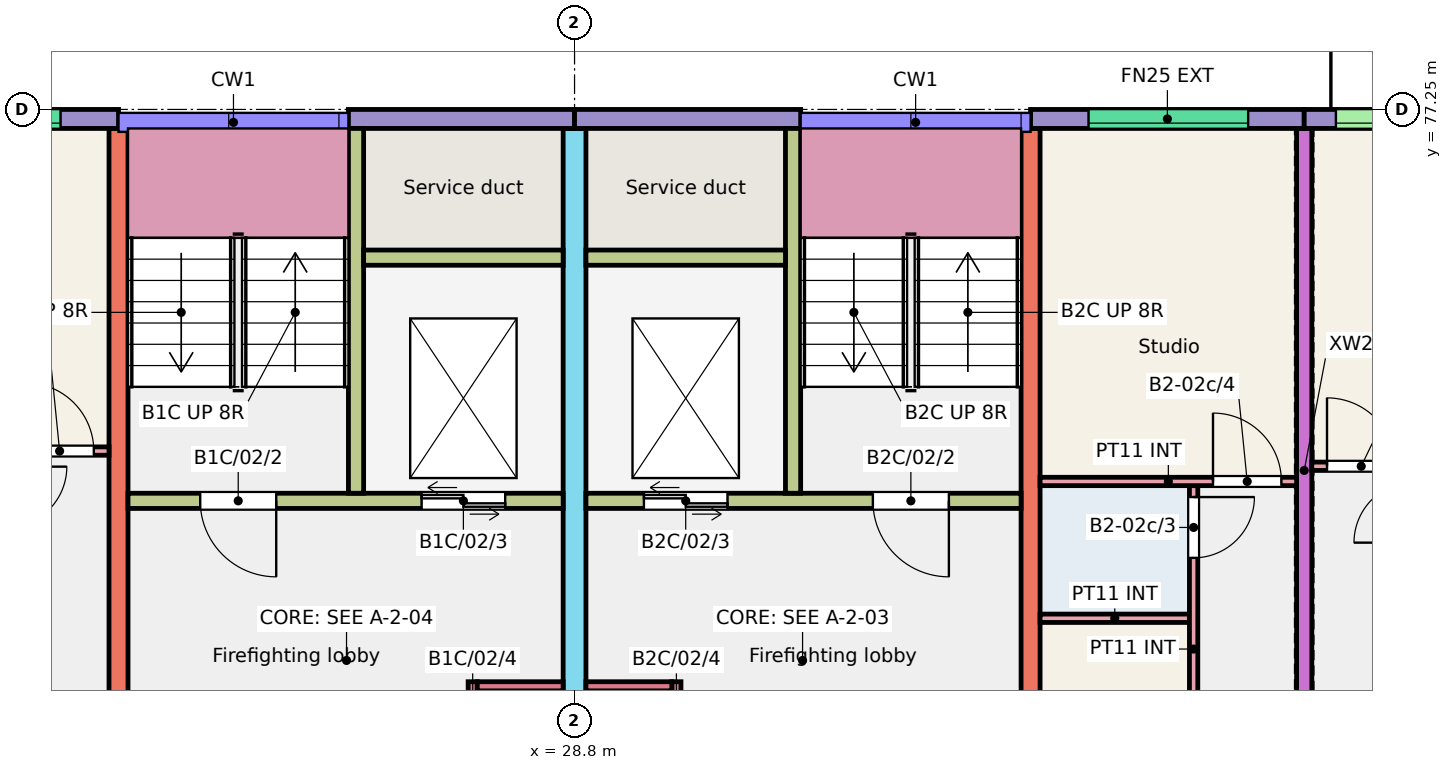
"""IFC4 building model, lengths in metres.
Left out: names, types, materials, properties, quantities, classifications, styles, units other than length and angle.
Written with IfcOpenShell. Run it as: python <this file> out.ifc"""

import sys

from ifc_helpers import new_model, si_unit, direction, frame, frame_2d, origin, place, context, subcontext, project, spatial, rectangle, extrude, element, fill, save


model = new_model("IFC4")
c1 = context("Model", 3, precision=1e-05, world=origin(), true_north=direction((0.0, 1.0)))
c2 = subcontext(c1, "Body", "Model", "MODEL_VIEW")
j1 = project(units=[si_unit("LENGTHUNIT", "METRE"), si_unit("PLANEANGLEUNIT", "RADIAN")], contexts=[c1])
p1 = place(None, origin())
s1 = spatial("IfcSite", under=j1, at=p1, CompositionType="ELEMENT")
p2 = place(p1, origin())
s2 = spatial("IfcBuilding", under=s1, at=p2, CompositionType="ELEMENT")
p3 = place(p2, frame((0.0, 0.0, 6.0)))
s3 = spatial("IfcBuildingStorey", under=s2, at=p3, CompositionType="ELEMENT", Elevation=6.0)
p4 = place(p3, frame((22.8, 68.0, 0.0), z_axis=(0.0, 0.0, 1.0), x_axis=(0.0, 1.0, 0.0)))
e1 = element("IfcWall", 1, at=p4, inside=s3, PredefinedType="SHEAR", context=c2, shape_type="SweptSolid", body=[
    extrude(rectangle(XDim=9.0, YDim=0.25, at=frame_2d((4.5, 0.0))), origin(), (0.0, 0.0, 1.0), 3.0),
])
p5 = place(p3, frame((28.8, 66.0, 0.0), z_axis=(0.0, 0.0, 1.0), x_axis=(0.0, 1.0, 0.0)))
e2 = element("IfcWall", 2, at=p5, inside=s3, PredefinedType="SHEAR", context=c2, shape_type="SweptSolid", body=[
    extrude(rectangle(XDim=11.0, YDim=0.3, at=frame_2d((5.5, 0.0))), origin(), (0.0, 0.0, 1.0), 3.0),
])
p6 = place(p5, frame((0.3, 0.0, 0.0)))
e3 = element("IfcOpeningElement", 3, at=p6, cuts=e2, PredefinedType="OPENING", context=c2, shape_type="SweptSolid", body=[
    extrude(rectangle(XDim=1.2, YDim=2.1, at=frame_2d((0.6, 1.05))), frame((0.0, 0.16, 0.0), z_axis=(0.0, -1.0, 0.0), x_axis=(1.0, 0.0, 0.0)), (0.0, 0.0, 1.0), 0.32),
])
p7 = place(p3, frame((34.8, 68.0, 0.0), z_axis=(0.0, 0.0, 1.0), x_axis=(0.0, 1.0, 0.0)))
e4 = element("IfcWall", 4, at=p7, inside=s3, PredefinedType="SHEAR", context=c2, shape_type="SweptSolid", body=[
    extrude(rectangle(XDim=9.0, YDim=0.25, at=frame_2d((4.5, 0.0))), origin(), (0.0, 0.0, 1.0), 3.0),
])
p8 = place(p3, frame((38.4, 68.0, 0.0), z_axis=(0.0, 0.0, 1.0), x_axis=(0.0, 1.0, 0.0)))
e5 = element("IfcWall", 5, at=p8, inside=s3, PredefinedType="SHEAR", context=c2, shape_type="SweptSolid", body=[
    extrude(rectangle(XDim=9.0, YDim=0.2, at=frame_2d((4.5, 0.0))), origin(), (0.0, 0.0, 1.0), 3.0),
])
p9 = place(p3, frame((19.2, 77.125, 0.0), z_axis=(0.0, 0.0, 1.0), x_axis=(1.0, 0.0, 0.0)))
e6 = element("IfcWall", 6, at=p9, inside=s3, PredefinedType="SOLIDWALL", context=c2, shape_type="SweptSolid", body=[
    extrude(rectangle(XDim=3.6, YDim=0.25, at=frame_2d((1.8, 0.0))), origin(), (0.0, 0.0, 1.0), 3.0),
])
p10 = place(p9, frame((0.738, 0.0, 1.2)))
e7 = element("IfcOpeningElement", 7, at=p10, cuts=e6, PredefinedType="OPENING", context=c2, shape_type="SweptSolid", body=[
    extrude(rectangle(XDim=2.1, YDim=1.2, at=frame_2d((1.05, 0.6))), frame((0.0, 0.135, 0.0), z_axis=(0.0, -1.0, 0.0), x_axis=(1.0, 0.0, 0.0)), (0.0, 0.0, 1.0), 0.27),
])
p11 = place(p3, frame((25.825, 77.125, 0.0), z_axis=(0.0, 0.0, 1.0), x_axis=(1.0, 0.0, 0.0)))
e8 = element("IfcWall", 8, at=p11, inside=s3, PredefinedType="SOLIDWALL", context=c2, shape_type="SweptSolid", body=[
    extrude(rectangle(XDim=2.975, YDim=0.25, at=frame_2d((1.488, 0.0))), origin(), (0.0, 0.0, 1.0), 3.0),
])
p12 = place(p3, frame((22.925, 72.1, 0.0), z_axis=(0.0, 0.0, 1.0), x_axis=(1.0, 0.0, 0.0)))
e9 = element("IfcWall", 9, at=p12, inside=s3, PredefinedType="SHEAR", context=c2, shape_type="SweptSolid", body=[
    extrude(rectangle(XDim=5.725, YDim=0.2, at=frame_2d((2.862, 0.0))), origin(), (0.0, 0.0, 1.0), 3.0),
])
p13 = place(p12, frame((0.95, 0.0, 0.0)))
e10 = element("IfcOpeningElement", 10, at=p13, cuts=e9, PredefinedType="OPENING", context=c2, shape_type="SweptSolid", body=[
    extrude(rectangle(XDim=1.0, YDim=2.1, at=frame_2d((0.5, 1.05))), frame((0.0, 0.11, 0.0), z_axis=(0.0, -1.0, 0.0), x_axis=(1.0, 0.0, 0.0)), (0.0, 0.0, 1.0), 0.22),
])
p14 = place(p12, frame((3.863, 0.0, 0.0)))
e11 = element("IfcOpeningElement", 11, at=p14, cuts=e9, PredefinedType="OPENING", context=c2, shape_type="SweptSolid", body=[
    extrude(rectangle(XDim=1.1, YDim=2.1, at=frame_2d((0.55, 1.05))), frame((0.0, 0.11, 0.0), z_axis=(0.0, -1.0, 0.0), x_axis=(1.0, 0.0, 0.0)), (0.0, 0.0, 1.0), 0.22),
])
p15 = place(p3, frame((25.925, 72.2, 0.0), z_axis=(0.0, 0.0, 1.0), x_axis=(0.0, 1.0, 0.0)))
e12 = element("IfcWall", 12, at=p15, inside=s3, PredefinedType="SHEAR", context=c2, shape_type="SweptSolid", body=[
    extrude(rectangle(XDim=4.8, YDim=0.2, at=frame_2d((2.4, 0.0))), origin(), (0.0, 0.0, 1.0), 3.0),
])
p16 = place(p3, frame((26.025, 75.3, 0.0), z_axis=(0.0, 0.0, 1.0), x_axis=(1.0, 0.0, 0.0)))
e13 = element("IfcWall", 13, at=p16, inside=s3, PredefinedType="SHEAR", context=c2, shape_type="SweptSolid", body=[
    extrude(rectangle(XDim=2.625, YDim=0.2, at=frame_2d((1.312, 0.0))), origin(), (0.0, 0.0, 1.0), 3.0),
])
p17 = place(p3, frame((27.46, 68.0, 0.0), z_axis=(0.0, 0.0, 1.0), x_axis=(0.0, 1.0, 0.0)))
e14 = element("IfcWall", 14, at=p17, inside=s3, PredefinedType="SHEAR", context=c2, shape_type="SweptSolid", body=[
    extrude(rectangle(XDim=1.72, YDim=0.12, at=frame_2d((0.86, 0.0))), origin(), (0.0, 0.0, 1.0), 3.0),
])
p18 = place(p17, frame((0.45, 0.0, 0.0)))
e15 = element("IfcOpeningElement", 15, at=p18, cuts=e14, PredefinedType="OPENING", context=c2, shape_type="SweptSolid", body=[
    extrude(rectangle(XDim=0.9, YDim=2.1, at=frame_2d((0.45, 1.05))), frame((0.0, 0.07, 0.0), z_axis=(0.0, -1.0, 0.0), x_axis=(1.0, 0.0, 0.0)), (0.0, 0.0, 1.0), 0.14),
])
p19 = place(p3, frame((27.52, 69.66, 0.0), z_axis=(0.0, 0.0, 1.0), x_axis=(1.0, 0.0, 0.0)))
e16 = element("IfcWall", 16, at=p19, inside=s3, PredefinedType="SHEAR", context=c2, shape_type="SweptSolid", body=[
    extrude(rectangle(XDim=1.13, YDim=0.12, at=frame_2d((0.565, 0.0))), origin(), (0.0, 0.0, 1.0), 3.0),
])
p20 = place(p3, frame((28.8, 77.125, 0.0), z_axis=(0.0, 0.0, 1.0), x_axis=(1.0, 0.0, 0.0)))
e17 = element("IfcWall", 17, at=p20, inside=s3, PredefinedType="SOLIDWALL", context=c2, shape_type="SweptSolid", body=[
    extrude(rectangle(XDim=2.975, YDim=0.25, at=frame_2d((1.487, 0.0))), origin(), (0.0, 0.0, 1.0), 3.0),
])
p21 = place(p3, frame((28.95, 72.1, 0.0), z_axis=(0.0, 0.0, 1.0), x_axis=(1.0, 0.0, 0.0)))
e18 = element("IfcWall", 18, at=p21, inside=s3, PredefinedType="SHEAR", context=c2, shape_type="SweptSolid", body=[
    extrude(rectangle(XDim=5.725, YDim=0.2, at=frame_2d((2.863, 0.0))), origin(), (0.0, 0.0, 1.0), 3.0),
])
p22 = place(p21, frame((3.775, 0.0, 0.0)))
e19 = element("IfcOpeningElement", 19, at=p22, cuts=e18, PredefinedType="OPENING", context=c2, shape_type="SweptSolid", body=[
    extrude(rectangle(XDim=1.0, YDim=2.1, at=frame_2d((0.5, 1.05))), frame((0.0, 0.11, 0.0), z_axis=(0.0, -1.0, 0.0), x_axis=(1.0, 0.0, 0.0)), (0.0, 0.0, 1.0), 0.22),
])
p23 = place(p21, frame((0.762, 0.0, 0.0)))
e20 = element("IfcOpeningElement", 20, at=p23, cuts=e18, PredefinedType="OPENING", context=c2, shape_type="SweptSolid", body=[
    extrude(rectangle(XDim=1.1, YDim=2.1, at=frame_2d((0.55, 1.05))), frame((0.0, 0.11, 0.0), z_axis=(0.0, -1.0, 0.0), x_axis=(1.0, 0.0, 0.0)), (0.0, 0.0, 1.0), 0.22),
])
p24 = place(p3, frame((31.675, 72.2, 0.0), z_axis=(0.0, 0.0, 1.0), x_axis=(0.0, 1.0, 0.0)))
e21 = element("IfcWall", 21, at=p24, inside=s3, PredefinedType="SHEAR", context=c2, shape_type="SweptSolid", body=[
    extrude(rectangle(XDim=4.8, YDim=0.2, at=frame_2d((2.4, 0.0))), origin(), (0.0, 0.0, 1.0), 3.0),
])
p25 = place(p3, frame((28.95, 75.3, 0.0), z_axis=(0.0, 0.0, 1.0), x_axis=(1.0, 0.0, 0.0)))
e22 = element("IfcWall", 22, at=p25, inside=s3, PredefinedType="SHEAR", context=c2, shape_type="SweptSolid", body=[
    extrude(rectangle(XDim=2.625, YDim=0.2, at=frame_2d((1.312, 0.0))), origin(), (0.0, 0.0, 1.0), 3.0),
])
p26 = place(p3, frame((30.14, 68.0, 0.0), z_axis=(0.0, 0.0, 1.0), x_axis=(0.0, 1.0, 0.0)))
e23 = element("IfcWall", 23, at=p26, inside=s3, PredefinedType="SHEAR", context=c2, shape_type="SweptSolid", body=[
    extrude(rectangle(XDim=1.72, YDim=0.12, at=frame_2d((0.86, 0.0))), origin(), (0.0, 0.0, 1.0), 3.0),
])
p27 = place(p26, frame((0.45, 0.0, 0.0)))
e24 = element("IfcOpeningElement", 24, at=p27, cuts=e23, PredefinedType="OPENING", context=c2, shape_type="SweptSolid", body=[
    extrude(rectangle(XDim=0.9, YDim=2.1, at=frame_2d((0.45, 1.05))), frame((0.0, 0.07, 0.0), z_axis=(0.0, -1.0, 0.0), x_axis=(1.0, 0.0, 0.0)), (0.0, 0.0, 1.0), 0.14),
])
p28 = place(p3, frame((28.95, 69.66, 0.0), z_axis=(0.0, 0.0, 1.0), x_axis=(1.0, 0.0, 0.0)))
e25 = element("IfcWall", 25, at=p28, inside=s3, PredefinedType="SHEAR", context=c2, shape_type="SweptSolid", body=[
    extrude(rectangle(XDim=1.13, YDim=0.12, at=frame_2d((0.565, 0.0))), origin(), (0.0, 0.0, 1.0), 3.0),
])
p29 = place(p3, frame((34.8, 77.125, 0.0), z_axis=(0.0, 0.0, 1.0), x_axis=(1.0, 0.0, 0.0)))
e26 = element("IfcWall", 26, at=p29, inside=s3, PredefinedType="SOLIDWALL", context=c2, shape_type="SweptSolid", body=[
    extrude(rectangle(XDim=3.6, YDim=0.25, at=frame_2d((1.8, 0.0))), origin(), (0.0, 0.0, 1.0), 3.0),
])
p30 = place(p29, frame((0.762, 0.0, 1.2)))
e27 = element("IfcOpeningElement", 27, at=p30, cuts=e26, PredefinedType="OPENING", context=c2, shape_type="SweptSolid", body=[
    extrude(rectangle(XDim=2.1, YDim=1.2, at=frame_2d((1.05, 0.6))), frame((0.0, 0.135, 0.0), z_axis=(0.0, -1.0, 0.0), x_axis=(1.0, 0.0, 0.0)), (0.0, 0.0, 1.0), 0.27),
])
p31 = place(p3, frame((38.4, 77.125, 0.0), z_axis=(0.0, 0.0, 1.0), x_axis=(1.0, 0.0, 0.0)))
e28 = element("IfcWall", 28, at=p31, inside=s3, PredefinedType="SOLIDWALL", context=c2, shape_type="SweptSolid", body=[
    extrude(rectangle(XDim=3.6, YDim=0.25, at=frame_2d((1.8, 0.0))), origin(), (0.0, 0.0, 1.0), 3.0),
])
p32 = place(p31, frame((0.417, 0.0, 1.2)))
e29 = element("IfcOpeningElement", 29, at=p32, cuts=e28, PredefinedType="OPENING", context=c2, shape_type="SweptSolid", body=[
    extrude(rectangle(XDim=1.5, YDim=1.2, at=frame_2d((0.75, 0.6))), frame((0.0, 0.135, 0.0), z_axis=(0.0, -1.0, 0.0), x_axis=(1.0, 0.0, 0.0)), (0.0, 0.0, 1.0), 0.27),
])
p33 = place(p31, frame((2.334, 0.0, 0.0)))
e30 = element("IfcOpeningElement", 30, at=p33, cuts=e28, PredefinedType="OPENING", context=c2, shape_type="SweptSolid", body=[
    extrude(rectangle(XDim=1.0, YDim=2.1, at=frame_2d((0.5, 1.05))), frame((0.0, 0.135, 0.0), z_axis=(0.0, -1.0, 0.0), x_axis=(1.0, 0.0, 0.0)), (0.0, 0.0, 1.0), 0.27),
])
p34 = place(p3, frame((19.3, 72.755, 0.0), z_axis=(0.0, 0.0, 1.0), x_axis=(1.0, 0.0, 0.0)))
e31 = element("IfcWall", 31, at=p34, inside=s3, PredefinedType="PARTITIONING", context=c2, shape_type="SweptSolid", body=[
    extrude(rectangle(XDim=3.375, YDim=0.11, at=frame_2d((1.688, 0.0))), origin(), (0.0, 0.0, 1.0), 2.8),
])
p35 = place(p34, frame((2.275, 0.0, 0.0)))
e32 = element("IfcOpeningElement", 32, at=p35, cuts=e31, PredefinedType="OPENING", context=c2, shape_type="SweptSolid", body=[
    extrude(rectangle(XDim=0.9, YDim=2.1, at=frame_2d((0.45, 1.05))), frame((0.0, 0.065, 0.0), z_axis=(0.0, -1.0, 0.0), x_axis=(1.0, 0.0, 0.0)), (0.0, 0.0, 1.0), 0.13),
])
p36 = place(p3, frame((38.5, 72.555, 0.0), z_axis=(0.0, 0.0, 1.0), x_axis=(1.0, 0.0, 0.0)))
e33 = element("IfcWall", 33, at=p36, inside=s3, PredefinedType="PARTITIONING", context=c2, shape_type="SweptSolid", body=[
    extrude(rectangle(XDim=3.4, YDim=0.11, at=frame_2d((1.7, 0.0))), origin(), (0.0, 0.0, 1.0), 2.8),
])
p37 = place(p36, frame((0.2, 0.0, 0.0)))
e34 = element("IfcOpeningElement", 34, at=p37, cuts=e33, PredefinedType="OPENING", context=c2, shape_type="SweptSolid", body=[
    extrude(rectangle(XDim=0.9, YDim=2.1, at=frame_2d((0.45, 1.05))), frame((0.0, 0.065, 0.0), z_axis=(0.0, -1.0, 0.0), x_axis=(1.0, 0.0, 0.0)), (0.0, 0.0, 1.0), 0.13),
])
p38 = place(p3, frame((34.925, 70.555, 0.0), z_axis=(0.0, 0.0, 1.0), x_axis=(1.0, 0.0, 0.0)))
e35 = element("IfcWall", 35, at=p38, inside=s3, PredefinedType="PARTITIONING", context=c2, shape_type="SweptSolid", body=[
    extrude(rectangle(XDim=1.965, YDim=0.11, at=frame_2d((0.982, 0.0))), origin(), (0.0, 0.0, 1.0), 2.8),
])
p39 = place(p3, frame((36.945, 68.0, 0.0), z_axis=(0.0, 0.0, 1.0), x_axis=(0.0, 1.0, 0.0)))
e36 = element("IfcWall", 36, at=p39, inside=s3, PredefinedType="PARTITIONING", context=c2, shape_type="SweptSolid", body=[
    extrude(rectangle(XDim=4.3, YDim=0.11, at=frame_2d((2.15, 0.0))), origin(), (0.0, 0.0, 1.0), 2.8),
])
p40 = place(p39, frame((0.2, 0.0, 0.0)))
e37 = element("IfcOpeningElement", 37, at=p40, cuts=e36, PredefinedType="OPENING", context=c2, shape_type="SweptSolid", body=[
    extrude(rectangle(XDim=0.8, YDim=2.1, at=frame_2d((0.4, 1.05))), frame((0.0, 0.065, 0.0), z_axis=(0.0, -1.0, 0.0), x_axis=(1.0, 0.0, 0.0)), (0.0, 0.0, 1.0), 0.13),
])
p41 = place(p39, frame((3.35, 0.0, 0.0)))
e38 = element("IfcOpeningElement", 38, at=p41, cuts=e36, PredefinedType="OPENING", context=c2, shape_type="SweptSolid", body=[
    extrude(rectangle(XDim=0.8, YDim=2.1, at=frame_2d((0.4, 1.05))), frame((0.0, 0.065, 0.0), z_axis=(0.0, -1.0, 0.0), x_axis=(1.0, 0.0, 0.0)), (0.0, 0.0, 1.0), 0.13),
])
p42 = place(p3, frame((34.925, 72.355, 0.0), z_axis=(0.0, 0.0, 1.0), x_axis=(1.0, 0.0, 0.0)))
e39 = element("IfcWall", 39, at=p42, inside=s3, PredefinedType="PARTITIONING", context=c2, shape_type="SweptSolid", body=[
    extrude(rectangle(XDim=3.375, YDim=0.11, at=frame_2d((1.688, 0.0))), origin(), (0.0, 0.0, 1.0), 2.8),
])
p43 = place(p42, frame((2.275, 0.0, 0.0)))
e40 = element("IfcOpeningElement", 40, at=p43, cuts=e39, PredefinedType="OPENING", context=c2, shape_type="SweptSolid", body=[
    extrude(rectangle(XDim=0.9, YDim=2.1, at=frame_2d((0.45, 1.05))), frame((0.0, 0.065, 0.0), z_axis=(0.0, -1.0, 0.0), x_axis=(1.0, 0.0, 0.0)), (0.0, 0.0, 1.0), 0.13),
])
p44 = place(p10, origin())
e41 = element("IfcWindow", 41, at=p44, inside=s3, PartitioningType="SINGLE_PANEL", PredefinedType="WINDOW", context=c2, shape_type="SweptSolid", body=[
    extrude(rectangle(XDim=2.1, YDim=1.2, at=frame_2d((1.05, 0.6))), frame((0.0, -0.025, 0.0), z_axis=(0.0, -1.0, 0.0), x_axis=(1.0, 0.0, 0.0)), (0.0, 0.0, 1.0), 0.06),
])
fill(e7, e41)
p45 = place(p32, origin())
e42 = element("IfcWindow", 42, at=p45, inside=s3, PartitioningType="SINGLE_PANEL", PredefinedType="WINDOW", context=c2, shape_type="SweptSolid", body=[
    extrude(rectangle(XDim=1.5, YDim=1.2, at=frame_2d((0.75, 0.6))), frame((0.0, -0.025, 0.0), z_axis=(0.0, -1.0, 0.0), x_axis=(1.0, 0.0, 0.0)), (0.0, 0.0, 1.0), 0.06),
])
fill(e29, e42)
p46 = place(p30, origin())
e43 = element("IfcWindow", 43, at=p46, inside=s3, PartitioningType="SINGLE_PANEL", PredefinedType="WINDOW", context=c2, shape_type="SweptSolid", body=[
    extrude(rectangle(XDim=2.1, YDim=1.2, at=frame_2d((1.05, 0.6))), frame((0.0, -0.025, 0.0), z_axis=(0.0, -1.0, 0.0), x_axis=(1.0, 0.0, 0.0)), (0.0, 0.0, 1.0), 0.06),
])
fill(e27, e43)
p47 = place(p35, origin())
e44 = element("IfcDoor", 44, at=p47, inside=s3, OperationType="SINGLE_SWING_LEFT", PredefinedType="DOOR", context=c2, shape_type="SweptSolid", body=[
    extrude(rectangle(XDim=0.9, YDim=2.1, at=frame_2d((0.45, 1.05))), frame((0.0, 0.025, 0.0), z_axis=(0.0, -1.0, 0.0), x_axis=(1.0, 0.0, 0.0)), (0.0, 0.0, 1.0), 0.05),
])
fill(e32, e44)
p48 = place(p37, origin())
e45 = element("IfcDoor", 45, at=p48, inside=s3, OperationType="SINGLE_SWING_LEFT", PredefinedType="DOOR", context=c2, shape_type="SweptSolid", body=[
    extrude(rectangle(XDim=0.9, YDim=2.1, at=frame_2d((0.45, 1.05))), frame((0.0, 0.025, 0.0), z_axis=(0.0, -1.0, 0.0), x_axis=(1.0, 0.0, 0.0)), (0.0, 0.0, 1.0), 0.05),
])
fill(e34, e45)
p49 = place(p41, origin())
e46 = element("IfcDoor", 46, at=p49, inside=s3, OperationType="SINGLE_SWING_RIGHT", PredefinedType="DOOR", context=c2, shape_type="SweptSolid", body=[
    extrude(rectangle(XDim=0.8, YDim=2.1, at=frame_2d((0.4, 1.05))), frame((0.0, 0.025, 0.0), z_axis=(0.0, -1.0, 0.0), x_axis=(1.0, 0.0, 0.0)), (0.0, 0.0, 1.0), 0.05),
])
fill(e38, e46)
p50 = place(p43, origin())
e47 = element("IfcDoor", 47, at=p50, inside=s3, OperationType="SINGLE_SWING_LEFT", PredefinedType="DOOR", context=c2, shape_type="SweptSolid", body=[
    extrude(rectangle(XDim=0.9, YDim=2.1, at=frame_2d((0.45, 1.05))), frame((0.0, 0.025, 0.0), z_axis=(0.0, -1.0, 0.0), x_axis=(1.0, 0.0, 0.0)), (0.0, 0.0, 1.0), 0.05),
])
fill(e40, e47)
p51 = place(p13, origin())
e48 = element("IfcDoor", 48, at=p51, inside=s3, OperationType="SINGLE_SWING_RIGHT", PredefinedType="DOOR", context=c2, shape_type="SweptSolid", body=[
    extrude(rectangle(XDim=1.0, YDim=2.1, at=frame_2d((0.5, 1.05))), frame((0.0, 0.025, 0.0), z_axis=(0.0, -1.0, 0.0), x_axis=(1.0, 0.0, 0.0)), (0.0, 0.0, 1.0), 0.05),
])
fill(e10, e48)
p52 = place(p14, origin())
e49 = element("IfcDoor", 49, at=p52, inside=s3, OperationType="DOUBLE_DOOR_SLIDING", PredefinedType="DOOR", context=c2, shape_type="SweptSolid", body=[
    extrude(rectangle(XDim=1.1, YDim=2.1, at=frame_2d((0.55, 1.05))), frame((0.0, 0.025, 0.0), z_axis=(0.0, -1.0, 0.0), x_axis=(1.0, 0.0, 0.0)), (0.0, 0.0, 1.0), 0.05),
])
fill(e11, e49)
p53 = place(p22, origin())
e50 = element("IfcDoor", 50, at=p53, inside=s3, OperationType="SINGLE_SWING_RIGHT", PredefinedType="DOOR", context=c2, shape_type="SweptSolid", body=[
    extrude(rectangle(XDim=1.0, YDim=2.1, at=frame_2d((0.5, 1.05))), frame((0.0, 0.025, 0.0), z_axis=(0.0, -1.0, 0.0), x_axis=(1.0, 0.0, 0.0)), (0.0, 0.0, 1.0), 0.05),
])
fill(e19, e50)
p54 = place(p23, origin())
e51 = element("IfcDoor", 51, at=p54, inside=s3, OperationType="DOUBLE_DOOR_SLIDING", PredefinedType="DOOR", context=c2, shape_type="SweptSolid", body=[
    extrude(rectangle(XDim=1.1, YDim=2.1, at=frame_2d((0.55, 1.05))), frame((0.0, 0.025, 0.0), z_axis=(0.0, -1.0, 0.0), x_axis=(1.0, 0.0, 0.0)), (0.0, 0.0, 1.0), 0.05),
])
fill(e20, e51)
save(model, sys.argv[1])
